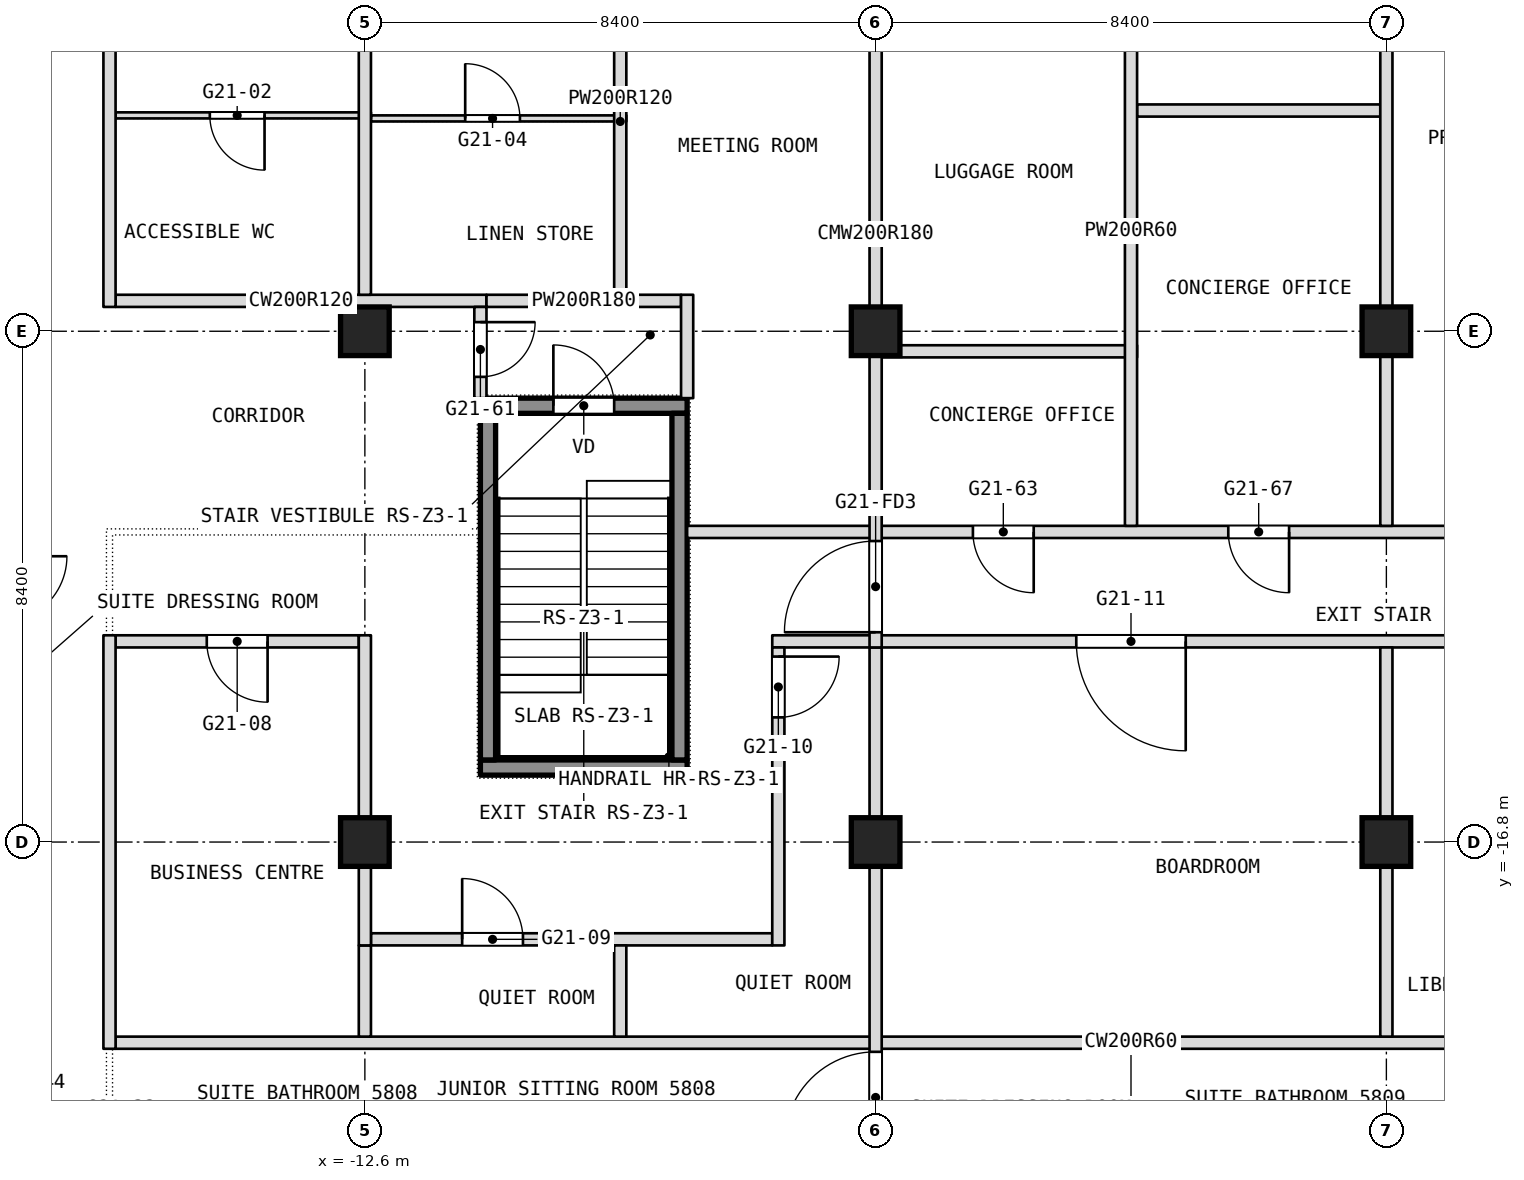
"""IFC4 building model, lengths in metres.
Left out: names, types, materials, properties, quantities, classifications, styles, units other than length and angle.
Written with IfcOpenShell. Run it as: python <this file> out.ifc"""

import sys

from ifc_helpers import new_model, si_unit, direction, frame, frame_2d, origin, origin_2d, place, context, subcontext, project, spatial, rectangle, extrude, element, fill, save


model = new_model("IFC4")
c1 = context("Model", 3, precision=1e-05, world=origin(), true_north=direction((0.0, 1.0)))
c2 = subcontext(c1, "Body", "Model", "MODEL_VIEW")
j1 = project(units=[si_unit("LENGTHUNIT", "METRE"), si_unit("PLANEANGLEUNIT", "RADIAN")], contexts=[c1])
p1 = place(None, origin())
s1 = spatial("IfcSite", under=j1, at=p1, CompositionType="ELEMENT")
p2 = place(p1, origin())
s2 = spatial("IfcBuilding", under=s1, at=p2, CompositionType="ELEMENT")
p3 = place(p2, frame((0.0, 0.0, 245.3)))
s3 = spatial("IfcBuildingStorey", under=s2, at=p3, CompositionType="ELEMENT", Elevation=245.3)
for number, where, z_axis, x_axis in (
    (1, (-12.6, -16.8, 0.0), (0.0, 0.0, 1.0), (1.0, 0.0, 0.0)),
    (2, (-12.6, -8.4, 0.0), (0.0, 0.0, 1.0), (1.0, 0.0, 0.0)),
    (3, (-4.2, -16.8, 0.0), (0.0, 0.0, 1.0), (1.0, 0.0, 0.0)),
    (4, (-4.2, -8.4, 0.0), (0.0, 0.0, 1.0), (1.0, 0.0, 0.0)),
    (5, (4.2, -16.8, 0.0), (0.0, 0.0, 1.0), (1.0, 0.0, 0.0)),
    (6, (4.2, -8.4, 0.0), (0.0, 0.0, 1.0), (1.0, 0.0, 0.0)),
):
    element("IfcColumn", number, at=place(p3, frame(where, z_axis=z_axis, x_axis=x_axis)), inside=s3, PredefinedType="COLUMN", context=c2, shape_type="SweptSolid", body=[
        extrude(rectangle(XDim=0.8, YDim=0.8, at=origin_2d()), origin(), (0.0, 0.0, 1.0), 3.6),
    ])
p4 = place(p3, frame((-16.7, -20.1, 0.0), z_axis=(0.0, 0.0, 1.0), x_axis=(1.0, 0.0, 0.0)))
e7 = element("IfcWall", 7, at=p4, inside=s3, PredefinedType="PARTITIONING", context=c2, shape_type="SweptSolid", body=[
    extrude(rectangle(XDim=33.4, YDim=0.2, at=frame_2d((16.7, 0.0))), origin(), (0.0, 0.0, 1.0), 3.34),
])
p5 = place(p3, frame((-12.5, -18.4, 0.0), z_axis=(0.0, 0.0, 1.0), x_axis=(1.0, 0.0, 0.0)))
e8 = element("IfcWall", 8, at=p5, inside=s3, PredefinedType="PARTITIONING", context=c2, shape_type="SweptSolid", body=[
    extrude(rectangle(XDim=6.6, YDim=0.2, at=frame_2d((3.3, 0.0))), origin(), (0.0, 0.0, 1.0), 3.34),
])
p6 = place(p5, frame((1.5, 0.0, 0.0)))
e9 = element("IfcOpeningElement", 9, at=p6, cuts=e8, PredefinedType="OPENING", context=c2, shape_type="SweptSolid", body=[
    extrude(rectangle(XDim=1.0, YDim=2.1, at=frame_2d((0.5, 1.05))), frame((0.0, 0.1, 0.0), z_axis=(0.0, -1.0, 0.0), x_axis=(1.0, 0.0, 0.0)), (0.0, 0.0, 1.0), 0.2),
])
p7 = place(p3, frame((-16.7, -13.5, 0.0), z_axis=(0.0, 0.0, 1.0), x_axis=(1.0, 0.0, 0.0)))
e10 = element("IfcWall", 10, at=p7, inside=s3, PredefinedType="PARTITIONING", context=c2, shape_type="SweptSolid", body=[
    extrude(rectangle(XDim=4.0, YDim=0.2, at=frame_2d((2.0, 0.0))), origin(), (0.0, 0.0, 1.0), 3.34),
])
p8 = place(p7, frame((1.5, 0.0, 0.0)))
e11 = element("IfcOpeningElement", 11, at=p8, cuts=e10, PredefinedType="OPENING", context=c2, shape_type="SweptSolid", body=[
    extrude(rectangle(XDim=1.0, YDim=2.1, at=frame_2d((0.5, 1.05))), frame((0.0, 0.1, 0.0), z_axis=(0.0, -1.0, 0.0), x_axis=(1.0, 0.0, 0.0)), (0.0, 0.0, 1.0), 0.2),
])
p9 = place(p3, frame((-5.9, -13.5, 0.0), z_axis=(0.0, 0.0, 1.0), x_axis=(1.0, 0.0, 0.0)))
e12 = element("IfcWall", 12, at=p9, inside=s3, PredefinedType="PARTITIONING", context=c2, shape_type="SweptSolid", body=[
    extrude(rectangle(XDim=11.6, YDim=0.2, at=frame_2d((5.8, 0.0))), origin(), (0.0, 0.0, 1.0), 3.34),
])
p10 = place(p9, frame((5.0, 0.0, 0.0)))
e13 = element("IfcOpeningElement", 13, at=p10, cuts=e12, PredefinedType="OPENING", context=c2, shape_type="SweptSolid", body=[
    extrude(rectangle(XDim=1.8, YDim=2.1, at=frame_2d((0.9, 1.05))), frame((0.0, 0.1, 0.0), z_axis=(0.0, -1.0, 0.0), x_axis=(1.0, 0.0, 0.0)), (0.0, 0.0, 1.0), 0.2),
])
p11 = place(p3, frame((-7.3, -11.7, 0.0), z_axis=(0.0, 0.0, 1.0), x_axis=(1.0, 0.0, 0.0)))
e14 = element("IfcWall", 14, at=p11, inside=s3, PredefinedType="PARTITIONING", context=c2, shape_type="SweptSolid", body=[
    extrude(rectangle(XDim=14.6, YDim=0.2, at=frame_2d((7.3, 0.0))), origin(), (0.0, 0.0, 1.0), 3.34),
])
p12 = place(p11, frame((4.7, 0.0, 0.0)))
e15 = element("IfcOpeningElement", 15, at=p12, cuts=e14, PredefinedType="OPENING", context=c2, shape_type="SweptSolid", body=[
    extrude(rectangle(XDim=1.0, YDim=2.1, at=frame_2d((0.5, 1.05))), frame((0.0, 0.1, 0.0), z_axis=(0.0, -1.0, 0.0), x_axis=(1.0, 0.0, 0.0)), (0.0, 0.0, 1.0), 0.2),
])
p13 = place(p11, frame((8.9, 0.0, 0.0)))
e16 = element("IfcOpeningElement", 16, at=p13, cuts=e14, PredefinedType="OPENING", context=c2, shape_type="SweptSolid", body=[
    extrude(rectangle(XDim=1.0, YDim=2.1, at=frame_2d((0.5, 1.05))), frame((0.0, 0.1, 0.0), z_axis=(0.0, -1.0, 0.0), x_axis=(1.0, 0.0, 0.0)), (0.0, 0.0, 1.0), 0.2),
])
p14 = place(p3, frame((-4.1, -8.73, 0.0), z_axis=(0.0, 0.0, 1.0), x_axis=(1.0, 0.0, 0.0)))
e17 = element("IfcWall", 17, at=p14, inside=s3, PredefinedType="PARTITIONING", context=c2, shape_type="SweptSolid", body=[
    extrude(rectangle(XDim=4.2, YDim=0.2, at=frame_2d((2.1, 0.0))), origin(), (0.0, 0.0, 1.0), 3.34),
])
p15 = place(p3, frame((-16.7, -7.9, 0.0), z_axis=(0.0, 0.0, 1.0), x_axis=(1.0, 0.0, 0.0)))
e18 = element("IfcWall", 18, at=p15, inside=s3, PredefinedType="PARTITIONING", context=c2, shape_type="SweptSolid", body=[
    extrude(rectangle(XDim=6.1, YDim=0.2, at=frame_2d((3.05, 0.0))), origin(), (0.0, 0.0, 1.0), 3.34),
])
p16 = place(p3, frame((-10.6, -7.9, 0.0), z_axis=(0.0, 0.0, 1.0), x_axis=(1.0, 0.0, 0.0)))
e19 = element("IfcWall", 19, at=p16, inside=s3, PredefinedType="PARTITIONING", context=c2, shape_type="SweptSolid", body=[
    extrude(rectangle(XDim=3.2, YDim=0.2, at=frame_2d((1.6, 0.0))), origin(), (0.0, 0.0, 1.0), 3.34),
])
p17 = place(p3, frame((-12.5, -4.9, 0.0), z_axis=(0.0, 0.0, 1.0), x_axis=(1.0, 0.0, 0.0)))
e20 = element("IfcWall", 20, at=p17, inside=s3, PredefinedType="PARTITIONING", context=c2, shape_type="SweptSolid", body=[
    extrude(rectangle(XDim=4.2, YDim=0.1, at=frame_2d((2.1, 0.0))), origin(), (0.0, 0.0, 1.0), 3.34),
])
p18 = place(p17, frame((1.55, 0.0, 0.0)))
e21 = element("IfcOpeningElement", 21, at=p18, cuts=e20, PredefinedType="OPENING", context=c2, shape_type="SweptSolid", body=[
    extrude(rectangle(XDim=0.9, YDim=2.1, at=frame_2d((0.45, 1.05))), frame((0.0, 0.05, 0.0), z_axis=(0.0, -1.0, 0.0), x_axis=(1.0, 0.0, 0.0)), (0.0, 0.0, 1.0), 0.1),
])
p19 = place(p3, frame((-16.7, -4.85, 0.0), z_axis=(0.0, 0.0, 1.0), x_axis=(1.0, 0.0, 0.0)))
e22 = element("IfcWall", 22, at=p19, inside=s3, PredefinedType="PARTITIONING", context=c2, shape_type="SweptSolid", body=[
    extrude(rectangle(XDim=4.2, YDim=0.1, at=frame_2d((2.1, 0.0))), origin(), (0.0, 0.0, 1.0), 3.34),
])
p20 = place(p19, frame((1.55, 0.0, 0.0)))
e23 = element("IfcOpeningElement", 23, at=p20, cuts=e22, PredefinedType="OPENING", context=c2, shape_type="SweptSolid", body=[
    extrude(rectangle(XDim=0.9, YDim=2.1, at=frame_2d((0.45, 1.05))), frame((0.0, 0.05, 0.0), z_axis=(0.0, -1.0, 0.0), x_axis=(1.0, 0.0, 0.0)), (0.0, 0.0, 1.0), 0.1),
])
p21 = place(p3, frame((0.1, -4.77, 0.0), z_axis=(0.0, 0.0, 1.0), x_axis=(1.0, 0.0, 0.0)))
e24 = element("IfcWall", 24, at=p21, inside=s3, PredefinedType="PARTITIONING", context=c2, shape_type="SweptSolid", body=[
    extrude(rectangle(XDim=4.0, YDim=0.2, at=frame_2d((2.0, 0.0))), origin(), (0.0, 0.0, 1.0), 3.34),
])
p22 = place(p3, frame((4.2, -20.0, 0.0), z_axis=(0.0, 0.0, 1.0), x_axis=(0.0, 1.0, 0.0)))
e25 = element("IfcWall", 25, at=p22, inside=s3, PredefinedType="PARTITIONING", context=c2, shape_type="SweptSolid", body=[
    extrude(rectangle(XDim=6.4, YDim=0.2, at=frame_2d((3.2, 0.0))), origin(), (0.0, 0.0, 1.0), 3.34),
])
for number, where, z_axis, x_axis in (
    (26, (4.2, -11.6, 0.0), (0.0, 0.0, 1.0), (0.0, 1.0, 0.0)),
    (27, (0.0, -11.6, 0.0), (0.0, 0.0, 1.0), (0.0, 1.0, 0.0)),
):
    element("IfcWall", number, at=place(p3, frame(where, z_axis=z_axis, x_axis=x_axis)), inside=s3, PredefinedType="PARTITIONING", context=c2, shape_type="SweptSolid", body=[
        extrude(rectangle(XDim=9.7, YDim=0.2, at=frame_2d((4.85, 0.0))), origin(), (0.0, 0.0, 1.0), 3.34),
    ])
p23 = place(p3, frame((-4.2, -22.0, 0.0), z_axis=(0.0, 0.0, 1.0), x_axis=(0.0, 1.0, 0.0)))
e28 = element("IfcWall", 28, at=p23, inside=s3, PredefinedType="PARTITIONING", context=c2, shape_type="SweptSolid", body=[
    extrude(rectangle(XDim=8.4, YDim=0.2, at=frame_2d((4.2, 0.0))), origin(), (0.0, 0.0, 1.0), 3.34),
])
p24 = place(p23, frame((0.25, 0.0, 0.0)))
e29 = element("IfcOpeningElement", 29, at=p24, cuts=e28, PredefinedType="OPENING", context=c2, shape_type="SweptSolid", body=[
    extrude(rectangle(XDim=1.5, YDim=2.1, at=frame_2d((0.75, 1.05))), frame((0.0, 0.1, 0.0), z_axis=(0.0, -1.0, 0.0), x_axis=(1.0, 0.0, 0.0)), (0.0, 0.0, 1.0), 0.2),
])
p25 = place(p3, frame((-4.2, -13.6, 0.0), z_axis=(0.0, 0.0, 1.0), x_axis=(0.0, 1.0, 0.0)))
e30 = element("IfcWall", 30, at=p25, inside=s3, PredefinedType="PARTITIONING", context=c2, shape_type="SweptSolid", body=[
    extrude(rectangle(XDim=13.6, YDim=0.2, at=frame_2d((6.8, 0.0))), origin(), (0.0, 0.0, 1.0), 3.34),
])
p26 = place(p25, frame((11.95, 0.0, 0.0)))
e31 = element("IfcOpeningElement", 31, at=p26, cuts=e30, PredefinedType="OPENING", context=c2, shape_type="SweptSolid", body=[
    extrude(rectangle(XDim=1.5, YDim=2.1, at=frame_2d((0.75, 1.05))), frame((0.0, 0.1, 0.0), z_axis=(0.0, -1.0, 0.0), x_axis=(1.0, 0.0, 0.0)), (0.0, 0.0, 1.0), 0.2),
])
p27 = place(p25, frame((0.25, 0.0, 0.0)))
e32 = element("IfcOpeningElement", 32, at=p27, cuts=e30, PredefinedType="OPENING", context=c2, shape_type="SweptSolid", body=[
    extrude(rectangle(XDim=1.5, YDim=2.1, at=frame_2d((0.75, 1.05))), frame((0.0, 0.1, 0.0), z_axis=(0.0, -1.0, 0.0), x_axis=(1.0, 0.0, 0.0)), (0.0, 0.0, 1.0), 0.2),
])
p28 = place(p3, frame((-5.8, -18.5, 0.0), z_axis=(0.0, 0.0, 1.0), x_axis=(0.0, 1.0, 0.0)))
e33 = element("IfcWall", 33, at=p28, inside=s3, PredefinedType="PARTITIONING", context=c2, shape_type="SweptSolid", body=[
    extrude(rectangle(XDim=4.9, YDim=0.2, at=frame_2d((2.45, 0.0))), origin(), (0.0, 0.0, 1.0), 3.34),
])
p29 = place(p28, frame((3.75, 0.0, 0.0)))
e34 = element("IfcOpeningElement", 34, at=p29, cuts=e33, PredefinedType="OPENING", context=c2, shape_type="SweptSolid", body=[
    extrude(rectangle(XDim=1.0, YDim=2.1, at=frame_2d((0.5, 1.05))), frame((0.0, 0.1, 0.0), z_axis=(0.0, -1.0, 0.0), x_axis=(1.0, 0.0, 0.0)), (0.0, 0.0, 1.0), 0.2),
])
p30 = place(p3, frame((-7.3, -9.5, 0.0), z_axis=(0.0, 0.0, 1.0), x_axis=(0.0, 1.0, 0.0)))
e35 = element("IfcWall", 35, at=p30, inside=s3, PredefinedType="PARTITIONING", context=c2, shape_type="SweptSolid", body=[
    extrude(rectangle(XDim=1.7, YDim=0.2, at=frame_2d((0.85, 0.0))), origin(), (0.0, 0.0, 1.0), 3.34),
])
p31 = place(p3, frame((-8.4, -20.0, 0.0), z_axis=(0.0, 0.0, 1.0), x_axis=(0.0, 1.0, 0.0)))
e36 = element("IfcWall", 36, at=p31, inside=s3, PredefinedType="PARTITIONING", context=c2, shape_type="SweptSolid", body=[
    extrude(rectangle(XDim=1.5, YDim=0.2, at=frame_2d((0.75, 0.0))), origin(), (0.0, 0.0, 1.0), 3.34),
])
p32 = place(p3, frame((-8.4, -8.0, 0.0), z_axis=(0.0, 0.0, 1.0), x_axis=(0.0, 1.0, 0.0)))
e37 = element("IfcWall", 37, at=p32, inside=s3, PredefinedType="PARTITIONING", context=c2, shape_type="SweptSolid", body=[
    extrude(rectangle(XDim=6.1, YDim=0.2, at=frame_2d((3.05, 0.0))), origin(), (0.0, 0.0, 1.0), 3.34),
])
p33 = place(p3, frame((-10.7, -9.5, 0.0), z_axis=(0.0, 0.0, 1.0), x_axis=(0.0, 1.0, 0.0)))
e38 = element("IfcWall", 38, at=p33, inside=s3, PredefinedType="PARTITIONING", context=c2, shape_type="SweptSolid", body=[
    extrude(rectangle(XDim=1.5, YDim=0.2, at=frame_2d((0.75, 0.0))), origin(), (0.0, 0.0, 1.0), 3.34),
])
p34 = place(p33, frame((0.35, 0.0, 0.0)))
e39 = element("IfcOpeningElement", 39, at=p34, cuts=e38, PredefinedType="OPENING", context=c2, shape_type="SweptSolid", body=[
    extrude(rectangle(XDim=0.9, YDim=2.1, at=frame_2d((0.45, 1.05))), frame((0.0, 0.1, 0.0), z_axis=(0.0, -1.0, 0.0), x_axis=(1.0, 0.0, 0.0)), (0.0, 0.0, 1.0), 0.2),
])
p35 = place(p3, frame((-12.6, -20.0, 0.0), z_axis=(0.0, 0.0, 1.0), x_axis=(0.0, 1.0, 0.0)))
e40 = element("IfcWall", 40, at=p35, inside=s3, PredefinedType="PARTITIONING", context=c2, shape_type="SweptSolid", body=[
    extrude(rectangle(XDim=1.5, YDim=0.2, at=frame_2d((0.75, 0.0))), origin(), (0.0, 0.0, 1.0), 3.34),
])
p36 = place(p3, frame((-12.6, -7.8, 0.0), z_axis=(0.0, 0.0, 1.0), x_axis=(0.0, 1.0, 0.0)))
e41 = element("IfcWall", 41, at=p36, inside=s3, PredefinedType="PARTITIONING", context=c2, shape_type="SweptSolid", body=[
    extrude(rectangle(XDim=5.9, YDim=0.2, at=frame_2d((2.95, 0.0))), origin(), (0.0, 0.0, 1.0), 3.34),
])
p37 = place(p3, frame((-12.6, -18.5, 0.0), z_axis=(0.0, 0.0, 1.0), x_axis=(0.0, 1.0, 0.0)))
e42 = element("IfcWall", 42, at=p37, inside=s3, PredefinedType="PARTITIONING", context=c2, shape_type="SweptSolid", body=[
    extrude(rectangle(XDim=5.1, YDim=0.2, at=frame_2d((2.55, 0.0))), origin(), (0.0, 0.0, 1.0), 3.34),
])
p38 = place(p3, frame((-16.8, -20.2, 0.0), z_axis=(0.0, 0.0, 1.0), x_axis=(0.0, 1.0, 0.0)))
e43 = element("IfcWall", 43, at=p38, inside=s3, PredefinedType="PARTITIONING", context=c2, shape_type="SweptSolid", body=[
    extrude(rectangle(XDim=6.8, YDim=0.2, at=frame_2d((3.4, 0.0))), origin(), (0.0, 0.0, 1.0), 3.34),
])
p39 = place(p3, frame((-16.8, -8.0, 0.0), z_axis=(0.0, 0.0, 1.0), x_axis=(0.0, 1.0, 0.0)))
e44 = element("IfcWall", 44, at=p39, inside=s3, PredefinedType="PARTITIONING", context=c2, shape_type="SweptSolid", body=[
    extrude(rectangle(XDim=6.1, YDim=0.2, at=frame_2d((3.05, 0.0))), origin(), (0.0, 0.0, 1.0), 3.34),
])
p40 = place(p3, frame((-10.7, -15.575, 0.1), z_axis=(0.0, 0.0, 1.0), x_axis=(1.0, 0.0, 0.0)))
e45 = element("IfcWall", 45, at=p40, inside=s3, PredefinedType="SHEAR", context=c2, shape_type="SweptSolid", body=[
    extrude(rectangle(XDim=3.4, YDim=0.25, at=frame_2d((1.7, 0.0))), origin(), (0.0, 0.0, 1.0), 3.6),
])
p41 = place(p3, frame((-10.7, -9.625, 0.1), z_axis=(0.0, 0.0, 1.0), x_axis=(1.0, 0.0, 0.0)))
e46 = element("IfcWall", 46, at=p41, inside=s3, PredefinedType="SHEAR", context=c2, shape_type="SweptSolid", body=[
    extrude(rectangle(XDim=3.4, YDim=0.25, at=frame_2d((1.7, 0.0))), origin(), (0.0, 0.0, 1.0), 3.6),
])
p42 = place(p41, frame((1.2, 0.0, 0.0)))
e47 = element("IfcOpeningElement", 47, at=p42, cuts=e46, PredefinedType="OPENING", context=c2, shape_type="SweptSolid", body=[
    extrude(rectangle(XDim=1.0, YDim=2.1, at=frame_2d((0.5, 1.05))), frame((0.0, 0.125, 0.0), z_axis=(0.0, -1.0, 0.0), x_axis=(1.0, 0.0, 0.0)), (0.0, 0.0, 1.0), 0.25),
])
for number, where, z_axis, x_axis in (
    (48, (-10.575, -15.45, 0.1), (0.0, 0.0, 1.0), (0.0, 1.0, 0.0)),
    (49, (-7.425, -15.45, 0.1), (0.0, 0.0, 1.0), (0.0, 1.0, 0.0)),
):
    element("IfcWall", number, at=place(p3, frame(where, z_axis=z_axis, x_axis=x_axis)), inside=s3, PredefinedType="SHEAR", context=c2, shape_type="SweptSolid", body=[
        extrude(rectangle(XDim=5.7, YDim=0.25, at=frame_2d((2.85, 0.0))), origin(), (0.0, 0.0, 1.0), 3.6),
    ])
p43 = place(p6, origin())
e50 = element("IfcDoor", 50, at=p43, inside=s3, OperationType="SINGLE_SWING_RIGHT", PredefinedType="DOOR", context=c2, shape_type="SweptSolid", body=[
    extrude(rectangle(XDim=1.0, YDim=2.1, at=frame_2d((0.5, 1.05))), frame((0.0, 0.025, 0.0), z_axis=(0.0, -1.0, 0.0), x_axis=(1.0, 0.0, 0.0)), (0.0, 0.0, 1.0), 0.05),
])
fill(e9, e50)
p44 = place(p8, origin())
e51 = element("IfcDoor", 51, at=p44, inside=s3, OperationType="SINGLE_SWING_RIGHT", PredefinedType="DOOR", context=c2, shape_type="SweptSolid", body=[
    extrude(rectangle(XDim=1.0, YDim=2.1, at=frame_2d((0.5, 1.05))), frame((0.0, 0.025, 0.0), z_axis=(0.0, -1.0, 0.0), x_axis=(1.0, 0.0, 0.0)), (0.0, 0.0, 1.0), 0.05),
])
fill(e11, e51)
p45 = place(p10, origin())
e52 = element("IfcDoor", 52, at=p45, inside=s3, OperationType="DOUBLE_DOOR_SINGLE_SWING", PredefinedType="DOOR", context=c2, shape_type="SweptSolid", body=[
    extrude(rectangle(XDim=1.8, YDim=2.1, at=frame_2d((0.9, 1.05))), frame((0.0, 0.025, 0.0), z_axis=(0.0, -1.0, 0.0), x_axis=(1.0, 0.0, 0.0)), (0.0, 0.0, 1.0), 0.05),
])
fill(e13, e52)
p46 = place(p12, origin())
e53 = element("IfcDoor", 53, at=p46, inside=s3, OperationType="SINGLE_SWING_LEFT", PredefinedType="DOOR", context=c2, shape_type="SweptSolid", body=[
    extrude(rectangle(XDim=1.0, YDim=2.1, at=frame_2d((0.5, 1.05))), frame((0.0, 0.025, 0.0), z_axis=(0.0, -1.0, 0.0), x_axis=(1.0, 0.0, 0.0)), (0.0, 0.0, 1.0), 0.05),
])
fill(e15, e53)
p47 = place(p13, origin())
e54 = element("IfcDoor", 54, at=p47, inside=s3, OperationType="SINGLE_SWING_LEFT", PredefinedType="DOOR", context=c2, shape_type="SweptSolid", body=[
    extrude(rectangle(XDim=1.0, YDim=2.1, at=frame_2d((0.5, 1.05))), frame((0.0, 0.025, 0.0), z_axis=(0.0, -1.0, 0.0), x_axis=(1.0, 0.0, 0.0)), (0.0, 0.0, 1.0), 0.05),
])
fill(e16, e54)
p48 = place(p18, origin())
e55 = element("IfcDoor", 55, at=p48, inside=s3, OperationType="SINGLE_SWING_RIGHT", PredefinedType="DOOR", context=c2, shape_type="SweptSolid", body=[
    extrude(rectangle(XDim=0.9, YDim=2.1, at=frame_2d((0.45, 1.05))), frame((0.0, 0.025, 0.0), z_axis=(0.0, -1.0, 0.0), x_axis=(1.0, 0.0, 0.0)), (0.0, 0.0, 1.0), 0.05),
])
fill(e21, e55)
p49 = place(p20, origin())
e56 = element("IfcDoor", 56, at=p49, inside=s3, OperationType="SINGLE_SWING_RIGHT", PredefinedType="DOOR", context=c2, shape_type="SweptSolid", body=[
    extrude(rectangle(XDim=0.9, YDim=2.1, at=frame_2d((0.45, 1.05))), frame((0.0, 0.025, 0.0), z_axis=(0.0, -1.0, 0.0), x_axis=(1.0, 0.0, 0.0)), (0.0, 0.0, 1.0), 0.05),
])
fill(e23, e56)
p50 = place(p29, origin())
e57 = element("IfcDoor", 57, at=p50, inside=s3, OperationType="SINGLE_SWING_RIGHT", PredefinedType="DOOR", context=c2, shape_type="SweptSolid", body=[
    extrude(rectangle(XDim=1.0, YDim=2.1, at=frame_2d((0.5, 1.05))), frame((0.0, 0.025, 0.0), z_axis=(0.0, -1.0, 0.0), x_axis=(1.0, 0.0, 0.0)), (0.0, 0.0, 1.0), 0.05),
])
fill(e34, e57)
p51 = place(p34, origin())
e58 = element("IfcDoor", 58, at=p51, inside=s3, OperationType="SINGLE_SWING_LEFT", PredefinedType="DOOR", context=c2, shape_type="SweptSolid", body=[
    extrude(rectangle(XDim=0.9, YDim=2.1, at=frame_2d((0.45, 1.05))), frame((0.0, 0.025, 0.0), z_axis=(0.0, -1.0, 0.0), x_axis=(1.0, 0.0, 0.0)), (0.0, 0.0, 1.0), 0.05),
])
fill(e39, e58)
p52 = place(p42, origin())
e59 = element("IfcDoor", 59, at=p52, inside=s3, OperationType="SINGLE_SWING_LEFT", PredefinedType="DOOR", context=c2, shape_type="SweptSolid", body=[
    extrude(rectangle(XDim=1.0, YDim=2.1, at=frame_2d((0.5, 1.05))), frame((0.0, 0.025, 0.0), z_axis=(0.0, -1.0, 0.0), x_axis=(1.0, 0.0, 0.0)), (0.0, 0.0, 1.0), 0.05),
])
fill(e47, e59)
p53 = place(p27, origin())
e60 = element("IfcDoor", 60, at=p53, inside=s3, OperationType="DOUBLE_DOOR_DOUBLE_SWING", PredefinedType="DOOR", context=c2, shape_type="SweptSolid", body=[
    extrude(rectangle(XDim=1.5, YDim=2.1, at=frame_2d((0.75, 1.05))), frame((0.0, 0.025, 0.0), z_axis=(0.0, -1.0, 0.0), x_axis=(1.0, 0.0, 0.0)), (0.0, 0.0, 1.0), 0.05),
])
fill(e32, e60)
p54 = place(p24, origin())
e61 = element("IfcDoor", 61, at=p54, inside=s3, OperationType="DOUBLE_DOOR_DOUBLE_SWING", PredefinedType="DOOR", context=c2, shape_type="SweptSolid", body=[
    extrude(rectangle(XDim=1.5, YDim=2.1, at=frame_2d((0.75, 1.05))), frame((0.0, 0.025, 0.0), z_axis=(0.0, -1.0, 0.0), x_axis=(1.0, 0.0, 0.0)), (0.0, 0.0, 1.0), 0.05),
])
fill(e29, e61)
save(model, sys.argv[1])
